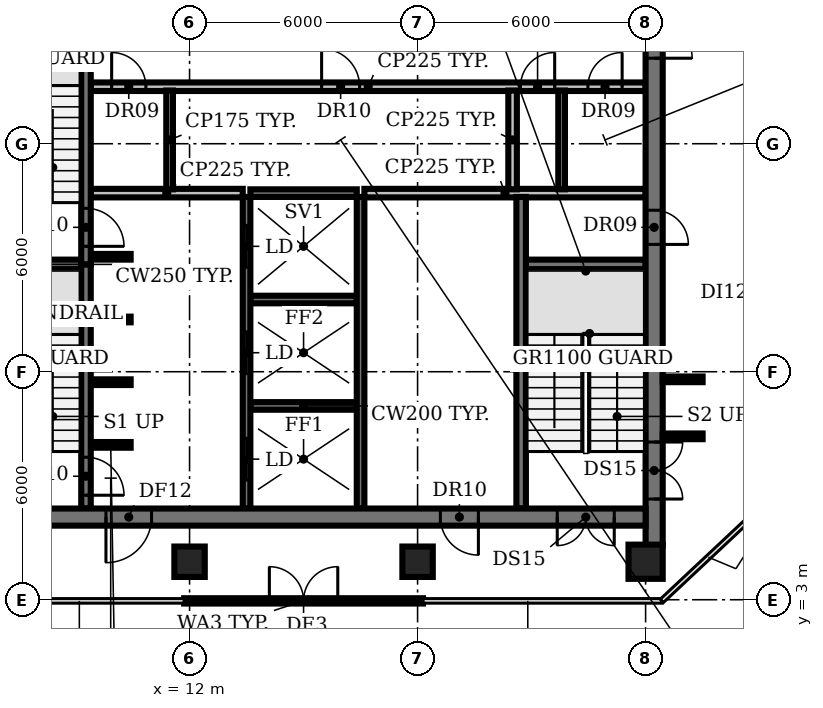
"""IFC4 building model, lengths in metres.
Left out: names, types, materials, properties, quantities, classifications, styles, units other than length and angle.
Written with IfcOpenShell. Run it as: python <this file> out.ifc"""

import sys

from ifc_helpers import new_model, si_unit, direction, frame, frame_2d, origin, origin_2d, place, context, subcontext, project, spatial, rectangle, circle, extrude, element, fill, save


model = new_model("IFC4")
c1 = context("Model", 3, precision=1e-05, world=origin(), true_north=direction((0.0, 1.0)))
c2 = subcontext(c1, "Body", "Model", "MODEL_VIEW")
j1 = project(units=[si_unit("LENGTHUNIT", "METRE"), si_unit("PLANEANGLEUNIT", "RADIAN")], contexts=[c1])
p1 = place(None, origin())
s1 = spatial("IfcSite", under=j1, at=p1, CompositionType="ELEMENT")
p2 = place(p1, origin())
s2 = spatial("IfcBuilding", under=s1, at=p2, CompositionType="ELEMENT")
p3 = place(p2, frame((0.0, 0.0, 213.8)))
s3 = spatial("IfcBuildingStorey", under=s2, at=p3, CompositionType="ELEMENT", Elevation=213.8)
for number, where, z_axis, x_axis in (
    (1, (12.0, 4.0, 0.0), (0.0, 0.0, 1.0), (1.0, 0.0, 0.0)),
    (2, (18.0, 4.0, 0.0), (0.0, 0.0, 1.0), (1.0, 0.0, 0.0)),
):
    element("IfcColumn", number, at=place(p3, frame(where, z_axis=z_axis, x_axis=x_axis)), inside=s3, PredefinedType="COLUMN", context=c2, shape_type="SweptSolid", body=[
        extrude(rectangle(XDim=0.8, YDim=0.8, at=origin_2d()), origin(), (0.0, 0.0, 1.0), 3.85),
    ])
p4 = place(p3, frame((24.0, 4.0, 0.0), z_axis=(0.0, 0.0, 1.0), x_axis=(1.0, 0.0, 0.0)))
e3 = element("IfcColumn", 3, at=p4, inside=s3, PredefinedType="COLUMN", context=c2, shape_type="SweptSolid", body=[
    extrude(circle(Radius=0.45, at=origin_2d()), origin(), (0.0, 0.0, 1.0), 3.85),
])
p5 = place(p3, frame((11.858, 2.97, 0.0), z_axis=(0.0, 0.0, 1.0), x_axis=(1.0, 0.0, 0.0)))
e4 = element("IfcWall", 4, at=p5, inside=s3, PredefinedType="SOLIDWALL", context=c2, shape_type="SweptSolid", body=[
    extrude(rectangle(XDim=6.284, YDim=0.14, at=frame_2d((3.142, 0.0))), origin(), (0.0, 0.0, 1.0), 3.85),
])
p6 = place(p5, frame((2.242, 0.0, 0.0)))
e5 = element("IfcOpeningElement", 5, at=p6, cuts=e4, PredefinedType="OPENING", context=c2, shape_type="SweptSolid", body=[
    extrude(rectangle(XDim=1.8, YDim=2.4, at=frame_2d((0.9, 1.2))), frame((0.0, 0.08, 0.0), z_axis=(0.0, -1.0, 0.0), x_axis=(1.0, 0.0, 0.0)), (0.0, 0.0, 1.0), 0.16),
])
p7 = place(p3, frame((9.4, 7.075, 0.0), z_axis=(0.0, 0.0, 1.0), x_axis=(1.0, 0.0, 0.0)))
e6 = element("IfcWall", 6, at=p7, inside=s3, PredefinedType="SHEAR", context=c2, shape_type="SweptSolid", body=[
    extrude(rectangle(XDim=1.05, YDim=0.15, at=frame_2d((0.525, 0.0))), origin(), (0.0, 0.0, 1.0), 3.85),
])
p8 = place(p3, frame((13.6, 8.1, 0.0), z_axis=(0.0, 0.0, 1.0), x_axis=(1.0, 0.0, 0.0)))
e7 = element("IfcWall", 7, at=p8, inside=s3, PredefinedType="SHEAR", context=c2, shape_type="SweptSolid", body=[
    extrude(rectangle(XDim=2.8, YDim=0.2, at=frame_2d((1.4, 0.0))), origin(), (0.0, 0.0, 1.0), 3.85),
])
for number, where, z_axis, x_axis in (
    (8, (9.4, 8.725, 0.0), (0.0, 0.0, 1.0), (1.0, 0.0, 0.0)),
    (9, (9.4, 10.375, 0.0), (0.0, 0.0, 1.0), (1.0, 0.0, 0.0)),
):
    element("IfcWall", number, at=place(p3, frame(where, z_axis=z_axis, x_axis=x_axis)), inside=s3, PredefinedType="SHEAR", context=c2, shape_type="SweptSolid", body=[
        extrude(rectangle(XDim=1.05, YDim=0.15, at=frame_2d((0.525, 0.0))), origin(), (0.0, 0.0, 1.0), 3.85),
    ])
p9 = place(p3, frame((13.6, 10.9, 0.0), z_axis=(0.0, 0.0, 1.0), x_axis=(1.0, 0.0, 0.0)))
e10 = element("IfcWall", 10, at=p9, inside=s3, PredefinedType="SHEAR", context=c2, shape_type="SweptSolid", body=[
    extrude(rectangle(XDim=2.8, YDim=0.2, at=frame_2d((1.4, 0.0))), origin(), (0.0, 0.0, 1.0), 3.85),
])
for number, where, z_axis, x_axis in (
    (11, (6.0, 11.825, 0.0), (0.0, 0.0, 1.0), (1.0, 0.0, 0.0)),
    (12, (20.85, 11.825, 0.0), (0.0, 0.0, 1.0), (1.0, 0.0, 0.0)),
):
    element("IfcWall", number, at=place(p3, frame(where, z_axis=z_axis, x_axis=x_axis)), inside=s3, PredefinedType="SHEAR", context=c2, shape_type="SweptSolid", body=[
        extrude(rectangle(XDim=3.15, YDim=0.25, at=frame_2d((1.575, 0.0))), origin(), (0.0, 0.0, 1.0), 3.85),
    ])
p10 = place(p3, frame((9.4, 12.025, 0.0), z_axis=(0.0, 0.0, 1.0), x_axis=(1.0, 0.0, 0.0)))
e13 = element("IfcWall", 13, at=p10, inside=s3, PredefinedType="SHEAR", context=c2, shape_type="SweptSolid", body=[
    extrude(rectangle(XDim=1.05, YDim=0.15, at=frame_2d((0.525, 0.0))), origin(), (0.0, 0.0, 1.0), 3.85),
])
p11 = place(p3, frame((9.4, 13.7, 0.0), z_axis=(0.0, 0.0, 1.0), x_axis=(1.0, 0.0, 0.0)))
e14 = element("IfcWall", 14, at=p11, inside=s3, PredefinedType="PARTITIONING", context=c2, shape_type="SweptSolid", body=[
    extrude(rectangle(XDim=4.0, YDim=0.225, at=frame_2d((2.0, 0.0))), origin(), (0.0, 0.0, 1.0), 3.85),
])
p12 = place(p3, frame((13.6, 13.7, 0.0), z_axis=(0.0, 0.0, 1.0), x_axis=(1.0, 0.0, 0.0)))
e15 = element("IfcWall", 15, at=p12, inside=s3, PredefinedType="SHEAR", context=c2, shape_type="SweptSolid", body=[
    extrude(rectangle(XDim=2.8, YDim=0.2, at=frame_2d((1.4, 0.0))), origin(), (0.0, 0.0, 1.0), 3.85),
])
p13 = place(p3, frame((16.6, 13.7, 0.0), z_axis=(0.0, 0.0, 1.0), x_axis=(1.0, 0.0, 0.0)))
e16 = element("IfcWall", 16, at=p13, inside=s3, PredefinedType="PARTITIONING", context=c2, shape_type="SweptSolid", body=[
    extrude(rectangle(XDim=7.4, YDim=0.225, at=frame_2d((3.7, 0.0))), origin(), (0.0, 0.0, 1.0), 3.85),
])
p14 = place(p3, frame((9.4, 16.5, 0.0), z_axis=(0.0, 0.0, 1.0), x_axis=(1.0, 0.0, 0.0)))
e17 = element("IfcWall", 17, at=p14, inside=s3, PredefinedType="PARTITIONING", context=c2, shape_type="SweptSolid", body=[
    extrude(rectangle(XDim=14.6, YDim=0.225, at=frame_2d((7.3, 0.0))), origin(), (0.0, 0.0, 1.0), 3.85),
])
p15 = place(p14, frame((0.55, 0.0, 0.0)))
e18 = element("IfcOpeningElement", 18, at=p15, cuts=e17, PredefinedType="OPENING", context=c2, shape_type="SweptSolid", body=[
    extrude(rectangle(XDim=0.9, YDim=2.1, at=frame_2d((0.45, 1.05))), frame((0.0, 0.123, 0.0), z_axis=(0.0, -1.0, 0.0), x_axis=(1.0, 0.0, 0.0)), (0.0, 0.0, 1.0), 0.245),
])
p16 = place(p14, frame((6.075, 0.0, 0.0)))
e19 = element("IfcOpeningElement", 19, at=p16, cuts=e17, PredefinedType="OPENING", context=c2, shape_type="SweptSolid", body=[
    extrude(rectangle(XDim=1.0, YDim=2.1, at=frame_2d((0.5, 1.05))), frame((0.0, 0.123, 0.0), z_axis=(0.0, -1.0, 0.0), x_axis=(1.0, 0.0, 0.0)), (0.0, 0.0, 1.0), 0.245),
])
p17 = place(p14, frame((11.308, 0.0, 0.0)))
e20 = element("IfcOpeningElement", 20, at=p17, cuts=e17, PredefinedType="OPENING", context=c2, shape_type="SweptSolid", body=[
    extrude(rectangle(XDim=0.9, YDim=2.1, at=frame_2d((0.45, 1.05))), frame((0.0, 0.123, 0.0), z_axis=(0.0, -1.0, 0.0), x_axis=(1.0, 0.0, 0.0)), (0.0, 0.0, 1.0), 0.245),
])
p18 = place(p14, frame((13.083, 0.0, 0.0)))
e21 = element("IfcOpeningElement", 21, at=p18, cuts=e17, PredefinedType="OPENING", context=c2, shape_type="SweptSolid", body=[
    extrude(rectangle(XDim=0.9, YDim=2.1, at=frame_2d((0.45, 1.05))), frame((0.0, 0.123, 0.0), z_axis=(0.0, -1.0, 0.0), x_axis=(1.0, 0.0, 0.0)), (0.0, 0.0, 1.0), 0.245),
])
p19 = place(p3, frame((9.275, 11.825, 0.0), z_axis=(0.0, 0.0, 1.0), x_axis=(0.0, -1.0, 0.0)))
e22 = element("IfcWall", 22, at=p19, inside=s3, PredefinedType="SHEAR", context=c2, shape_type="SweptSolid", body=[
    extrude(rectangle(XDim=6.425, YDim=0.25, at=frame_2d((3.212, 0.0))), origin(), (0.0, 0.0, 1.0), 3.85),
])
p20 = place(p19, frame((5.075, 0.0, 0.0)))
e23 = element("IfcOpeningElement", 23, at=p20, cuts=e22, PredefinedType="OPENING", context=c2, shape_type="SweptSolid", body=[
    extrude(rectangle(XDim=1.0, YDim=2.1, at=frame_2d((0.5, 1.05))), frame((0.0, 0.135, 0.0), z_axis=(0.0, -1.0, 0.0), x_axis=(1.0, 0.0, 0.0)), (0.0, 0.0, 1.0), 0.27),
])
p21 = place(p3, frame((9.275, 18.375, 0.0), z_axis=(0.0, 0.0, 1.0), x_axis=(0.0, -1.0, 0.0)))
e24 = element("IfcWall", 24, at=p21, inside=s3, PredefinedType="SHEAR", context=c2, shape_type="SweptSolid", body=[
    extrude(rectangle(XDim=6.55, YDim=0.25, at=frame_2d((3.275, 0.0))), origin(), (0.0, 0.0, 1.0), 3.85),
])
p22 = place(p21, frame((5.075, 0.0, 0.0)))
e25 = element("IfcOpeningElement", 25, at=p22, cuts=e24, PredefinedType="OPENING", context=c2, shape_type="SweptSolid", body=[
    extrude(rectangle(XDim=1.0, YDim=2.1, at=frame_2d((0.5, 1.05))), frame((0.0, 0.135, 0.0), z_axis=(0.0, -1.0, 0.0), x_axis=(1.0, 0.0, 0.0)), (0.0, 0.0, 1.0), 0.27),
])
p23 = place(p3, frame((11.475, 13.8, 0.0), z_axis=(0.0, 0.0, 1.0), x_axis=(0.0, 1.0, 0.0)))
e26 = element("IfcWall", 26, at=p23, inside=s3, PredefinedType="PARTITIONING", context=c2, shape_type="SweptSolid", body=[
    extrude(rectangle(XDim=2.6, YDim=0.175, at=frame_2d((1.3, 0.0))), origin(), (0.0, 0.0, 1.0), 3.85),
])
p24 = place(p3, frame((13.5, 5.4, 0.0), z_axis=(0.0, 0.0, 1.0), x_axis=(0.0, 1.0, 0.0)))
e27 = element("IfcWall", 27, at=p24, inside=s3, PredefinedType="SHEAR", context=c2, shape_type="SweptSolid", body=[
    extrude(rectangle(XDim=8.2, YDim=0.2, at=frame_2d((4.1, 0.0))), origin(), (0.0, 0.0, 1.0), 3.85),
])
p25 = place(p24, frame((0.75, 0.0, 0.0)))
e28 = element("IfcOpeningElement", 28, at=p25, cuts=e27, PredefinedType="OPENING", context=c2, shape_type="SweptSolid", body=[
    extrude(rectangle(XDim=1.1, YDim=2.1, at=frame_2d((0.55, 1.05))), frame((0.0, 0.11, 0.0), z_axis=(0.0, -1.0, 0.0), x_axis=(1.0, 0.0, 0.0)), (0.0, 0.0, 1.0), 0.22),
])
p26 = place(p24, frame((3.55, 0.0, 0.0)))
e29 = element("IfcOpeningElement", 29, at=p26, cuts=e27, PredefinedType="OPENING", context=c2, shape_type="SweptSolid", body=[
    extrude(rectangle(XDim=1.1, YDim=2.1, at=frame_2d((0.55, 1.05))), frame((0.0, 0.11, 0.0), z_axis=(0.0, -1.0, 0.0), x_axis=(1.0, 0.0, 0.0)), (0.0, 0.0, 1.0), 0.22),
])
p27 = place(p24, frame((6.35, 0.0, 0.0)))
e30 = element("IfcOpeningElement", 30, at=p27, cuts=e27, PredefinedType="OPENING", context=c2, shape_type="SweptSolid", body=[
    extrude(rectangle(XDim=1.1, YDim=2.1, at=frame_2d((0.55, 1.05))), frame((0.0, 0.11, 0.0), z_axis=(0.0, -1.0, 0.0), x_axis=(1.0, 0.0, 0.0)), (0.0, 0.0, 1.0), 0.22),
])
p28 = place(p3, frame((16.5, 5.4, 0.0), z_axis=(0.0, 0.0, 1.0), x_axis=(0.0, 1.0, 0.0)))
e31 = element("IfcWall", 31, at=p28, inside=s3, PredefinedType="SHEAR", context=c2, shape_type="SweptSolid", body=[
    extrude(rectangle(XDim=8.2, YDim=0.2, at=frame_2d((4.1, 0.0))), origin(), (0.0, 0.0, 1.0), 3.85),
])
p29 = place(p3, frame((20.5, 13.8, 0.0), z_axis=(0.0, 0.0, 1.0), x_axis=(0.0, 1.0, 0.0)))
e32 = element("IfcWall", 32, at=p29, inside=s3, PredefinedType="PARTITIONING", context=c2, shape_type="SweptSolid", body=[
    extrude(rectangle(XDim=2.6, YDim=0.225, at=frame_2d((1.3, 0.0))), origin(), (0.0, 0.0, 1.0), 3.85),
])
p30 = place(p3, frame((20.725, 5.4, 0.0), z_axis=(0.0, 0.0, 1.0), x_axis=(0.0, 1.0, 0.0)))
e33 = element("IfcWall", 33, at=p30, inside=s3, PredefinedType="SHEAR", context=c2, shape_type="SweptSolid", body=[
    extrude(rectangle(XDim=8.2, YDim=0.25, at=frame_2d((4.1, 0.0))), origin(), (0.0, 0.0, 1.0), 3.85),
])
p31 = place(p3, frame((21.79, 13.8, 0.0), z_axis=(0.0, 0.0, 1.0), x_axis=(0.0, 1.0, 0.0)))
e34 = element("IfcWall", 34, at=p31, inside=s3, PredefinedType="PARTITIONING", context=c2, shape_type="SweptSolid", body=[
    extrude(rectangle(XDim=2.6, YDim=0.175, at=frame_2d((1.3, 0.0))), origin(), (0.0, 0.0, 1.0), 3.85),
])
p32 = place(p3, frame((24.225, 25.25, 0.0), z_axis=(0.0, 0.0, 1.0), x_axis=(0.0, -1.0, 0.0)))
e35 = element("IfcWall", 35, at=p32, inside=s3, PredefinedType="SHEAR", context=c2, shape_type="SweptSolid", body=[
    extrude(rectangle(XDim=20.83, YDim=0.45, at=frame_2d((10.415, 0.0))), origin(), (0.0, 0.0, 1.0), 3.85),
])
p33 = place(p32, frame((18.1, 0.0, 0.0)))
e36 = element("IfcOpeningElement", 36, at=p33, cuts=e35, PredefinedType="OPENING", context=c2, shape_type="SweptSolid", body=[
    extrude(rectangle(XDim=1.5, YDim=2.1, at=frame_2d((0.75, 1.05))), frame((0.0, 0.235, 0.0), z_axis=(0.0, -1.0, 0.0), x_axis=(1.0, 0.0, 0.0)), (0.0, 0.0, 1.0), 0.47),
])
p34 = place(p32, frame((12.0, 0.0, 0.0)))
e37 = element("IfcOpeningElement", 37, at=p34, cuts=e35, PredefinedType="OPENING", context=c2, shape_type="SweptSolid", body=[
    extrude(rectangle(XDim=0.9, YDim=2.1, at=frame_2d((0.45, 1.05))), frame((0.0, 0.235, 0.0), z_axis=(0.0, -1.0, 0.0), x_axis=(1.0, 0.0, 0.0)), (0.0, 0.0, 1.0), 0.47),
])
p35 = place(p32, frame((6.0, 0.0, 0.0)))
e38 = element("IfcOpeningElement", 38, at=p35, cuts=e35, PredefinedType="OPENING", context=c2, shape_type="SweptSolid", body=[
    extrude(rectangle(XDim=2.0, YDim=2.1, at=frame_2d((1.0, 1.05))), frame((0.0, 0.235, 0.0), z_axis=(0.0, -1.0, 0.0), x_axis=(1.0, 0.0, 0.0)), (0.0, 0.0, 1.0), 0.47),
])
p36 = place(p3, frame((24.0, 5.175, 0.0), z_axis=(0.0, 0.0, 1.0), x_axis=(-1.0, 0.0, 0.0)))
e39 = element("IfcWall", 39, at=p36, inside=s3, PredefinedType="SHEAR", context=c2, shape_type="SweptSolid", body=[
    extrude(rectangle(XDim=18.0, YDim=0.45, at=frame_2d((9.0, 0.0))), origin(), (0.0, 0.0, 1.0), 3.85),
])
p37 = place(p36, frame((0.825, 0.0, 0.0)))
e40 = element("IfcOpeningElement", 40, at=p37, cuts=e39, PredefinedType="OPENING", context=c2, shape_type="SweptSolid", body=[
    extrude(rectangle(XDim=1.5, YDim=2.1, at=frame_2d((0.75, 1.05))), frame((0.0, 0.235, 0.0), z_axis=(0.0, -1.0, 0.0), x_axis=(1.0, 0.0, 0.0)), (0.0, 0.0, 1.0), 0.47),
])
p38 = place(p36, frame((15.675, 0.0, 0.0)))
e41 = element("IfcOpeningElement", 41, at=p38, cuts=e39, PredefinedType="OPENING", context=c2, shape_type="SweptSolid", body=[
    extrude(rectangle(XDim=1.5, YDim=2.1, at=frame_2d((0.75, 1.05))), frame((0.0, 0.235, 0.0), z_axis=(0.0, -1.0, 0.0), x_axis=(1.0, 0.0, 0.0)), (0.0, 0.0, 1.0), 0.47),
])
p39 = place(p36, frame((13.0, 0.0, 0.0)))
e42 = element("IfcOpeningElement", 42, at=p39, cuts=e39, PredefinedType="OPENING", context=c2, shape_type="SweptSolid", body=[
    extrude(rectangle(XDim=1.2, YDim=2.1, at=frame_2d((0.6, 1.05))), frame((0.0, 0.235, 0.0), z_axis=(0.0, -1.0, 0.0), x_axis=(1.0, 0.0, 0.0)), (0.0, 0.0, 1.0), 0.47),
])
p40 = place(p36, frame((4.4, 0.0, 0.0)))
e43 = element("IfcOpeningElement", 43, at=p40, cuts=e39, PredefinedType="OPENING", context=c2, shape_type="SweptSolid", body=[
    extrude(rectangle(XDim=1.0, YDim=2.1, at=frame_2d((0.5, 1.05))), frame((0.0, 0.235, 0.0), z_axis=(0.0, -1.0, 0.0), x_axis=(1.0, 0.0, 0.0)), (0.0, 0.0, 1.0), 0.47),
])
for number, where, z_axis, x_axis in (
    (44, (24.45, 7.3, 0.0), (0.0, 0.0, 1.0), (1.0, 0.0, 0.0)),
    (45, (24.45, 8.8, 0.0), (0.0, 0.0, 1.0), (1.0, 0.0, 0.0)),
):
    element("IfcWall", number, at=place(p3, frame(where, z_axis=z_axis, x_axis=x_axis)), inside=s3, PredefinedType="PARTITIONING", context=c2, shape_type="SweptSolid", body=[
        extrude(rectangle(XDim=1.05, YDim=0.15, at=frame_2d((0.525, 0.0))), origin(), (0.0, 0.0, 1.0), 2.88),
    ])
p41 = place(p6, origin())
e46 = element("IfcDoor", 46, at=p41, inside=s3, OperationType="DOUBLE_DOOR_DOUBLE_SWING", PredefinedType="DOOR", context=c2, shape_type="SweptSolid", body=[
    extrude(rectangle(XDim=1.8, YDim=2.4, at=frame_2d((0.9, 1.2))), frame((0.0, 0.025, 0.0), z_axis=(0.0, -1.0, 0.0), x_axis=(1.0, 0.0, 0.0)), (0.0, 0.0, 1.0), 0.05),
])
fill(e5, e46)
p42 = place(p15, origin())
e47 = element("IfcDoor", 47, at=p42, inside=s3, OperationType="SINGLE_SWING_LEFT", PredefinedType="DOOR", context=c2, shape_type="SweptSolid", body=[
    extrude(rectangle(XDim=0.9, YDim=2.1, at=frame_2d((0.45, 1.05))), frame((0.0, 0.025, 0.0), z_axis=(0.0, -1.0, 0.0), x_axis=(1.0, 0.0, 0.0)), (0.0, 0.0, 1.0), 0.05),
])
fill(e18, e47)
p43 = place(p16, origin())
e48 = element("IfcDoor", 48, at=p43, inside=s3, OperationType="SINGLE_SWING_LEFT", PredefinedType="DOOR", context=c2, shape_type="SweptSolid", body=[
    extrude(rectangle(XDim=1.0, YDim=2.1, at=frame_2d((0.5, 1.05))), frame((0.0, 0.025, 0.0), z_axis=(0.0, -1.0, 0.0), x_axis=(1.0, 0.0, 0.0)), (0.0, 0.0, 1.0), 0.05),
])
fill(e19, e48)
p44 = place(p17, origin())
e49 = element("IfcDoor", 49, at=p44, inside=s3, OperationType="SINGLE_SWING_RIGHT", PredefinedType="DOOR", context=c2, shape_type="SweptSolid", body=[
    extrude(rectangle(XDim=0.9, YDim=2.1, at=frame_2d((0.45, 1.05))), frame((0.0, 0.025, 0.0), z_axis=(0.0, -1.0, 0.0), x_axis=(1.0, 0.0, 0.0)), (0.0, 0.0, 1.0), 0.05),
])
fill(e20, e49)
p45 = place(p18, origin())
e50 = element("IfcDoor", 50, at=p45, inside=s3, OperationType="SINGLE_SWING_RIGHT", PredefinedType="DOOR", context=c2, shape_type="SweptSolid", body=[
    extrude(rectangle(XDim=0.9, YDim=2.1, at=frame_2d((0.45, 1.05))), frame((0.0, 0.025, 0.0), z_axis=(0.0, -1.0, 0.0), x_axis=(1.0, 0.0, 0.0)), (0.0, 0.0, 1.0), 0.05),
])
fill(e21, e50)
p46 = place(p20, origin())
e51 = element("IfcDoor", 51, at=p46, inside=s3, OperationType="SINGLE_SWING_RIGHT", PredefinedType="DOOR", context=c2, shape_type="SweptSolid", body=[
    extrude(rectangle(XDim=1.0, YDim=2.1, at=frame_2d((0.5, 1.05))), frame((0.0, 0.025, 0.0), z_axis=(0.0, -1.0, 0.0), x_axis=(1.0, 0.0, 0.0)), (0.0, 0.0, 1.0), 0.05),
])
fill(e23, e51)
p47 = place(p22, origin())
e52 = element("IfcDoor", 52, at=p47, inside=s3, OperationType="SINGLE_SWING_RIGHT", PredefinedType="DOOR", context=c2, shape_type="SweptSolid", body=[
    extrude(rectangle(XDim=1.0, YDim=2.1, at=frame_2d((0.5, 1.05))), frame((0.0, 0.025, 0.0), z_axis=(0.0, -1.0, 0.0), x_axis=(1.0, 0.0, 0.0)), (0.0, 0.0, 1.0), 0.05),
])
fill(e25, e52)
p48 = place(p25, origin())
e53 = element("IfcDoor", 53, at=p48, inside=s3, OperationType="DOUBLE_DOOR_SLIDING", PredefinedType="DOOR", context=c2, shape_type="SweptSolid", body=[
    extrude(rectangle(XDim=1.1, YDim=2.1, at=frame_2d((0.55, 1.05))), frame((0.0, 0.025, 0.0), z_axis=(0.0, -1.0, 0.0), x_axis=(1.0, 0.0, 0.0)), (0.0, 0.0, 1.0), 0.05),
])
fill(e28, e53)
p49 = place(p26, origin())
e54 = element("IfcDoor", 54, at=p49, inside=s3, OperationType="DOUBLE_DOOR_SLIDING", PredefinedType="DOOR", context=c2, shape_type="SweptSolid", body=[
    extrude(rectangle(XDim=1.1, YDim=2.1, at=frame_2d((0.55, 1.05))), frame((0.0, 0.025, 0.0), z_axis=(0.0, -1.0, 0.0), x_axis=(1.0, 0.0, 0.0)), (0.0, 0.0, 1.0), 0.05),
])
fill(e29, e54)
p50 = place(p27, origin())
e55 = element("IfcDoor", 55, at=p50, inside=s3, OperationType="DOUBLE_DOOR_SLIDING", PredefinedType="DOOR", context=c2, shape_type="SweptSolid", body=[
    extrude(rectangle(XDim=1.1, YDim=2.1, at=frame_2d((0.55, 1.05))), frame((0.0, 0.025, 0.0), z_axis=(0.0, -1.0, 0.0), x_axis=(1.0, 0.0, 0.0)), (0.0, 0.0, 1.0), 0.05),
])
fill(e30, e55)
p51 = place(p33, origin())
e56 = element("IfcDoor", 56, at=p51, inside=s3, OperationType="DOUBLE_DOOR_SINGLE_SWING", PredefinedType="DOOR", context=c2, shape_type="SweptSolid", body=[
    extrude(rectangle(XDim=1.5, YDim=2.1, at=frame_2d((0.75, 1.05))), frame((0.0, 0.025, 0.0), z_axis=(0.0, -1.0, 0.0), x_axis=(1.0, 0.0, 0.0)), (0.0, 0.0, 1.0), 0.05),
])
fill(e36, e56)
p52 = place(p34, origin())
e57 = element("IfcDoor", 57, at=p52, inside=s3, OperationType="SINGLE_SWING_RIGHT", PredefinedType="DOOR", context=c2, shape_type="SweptSolid", body=[
    extrude(rectangle(XDim=0.9, YDim=2.1, at=frame_2d((0.45, 1.05))), frame((0.0, 0.025, 0.0), z_axis=(0.0, -1.0, 0.0), x_axis=(1.0, 0.0, 0.0)), (0.0, 0.0, 1.0), 0.05),
])
fill(e37, e57)
p53 = place(p35, origin())
e58 = element("IfcDoor", 58, at=p53, inside=s3, OperationType="DOUBLE_DOOR_SINGLE_SWING", PredefinedType="DOOR", context=c2, shape_type="SweptSolid", body=[
    extrude(rectangle(XDim=2.0, YDim=2.1, at=frame_2d((1.0, 1.05))), frame((0.0, 0.025, 0.0), z_axis=(0.0, -1.0, 0.0), x_axis=(1.0, 0.0, 0.0)), (0.0, 0.0, 1.0), 0.05),
])
fill(e38, e58)
p54 = place(p37, origin())
e59 = element("IfcDoor", 59, at=p54, inside=s3, OperationType="DOUBLE_DOOR_SINGLE_SWING", PredefinedType="DOOR", context=c2, shape_type="SweptSolid", body=[
    extrude(rectangle(XDim=1.5, YDim=2.1, at=frame_2d((0.75, 1.05))), frame((0.0, 0.025, 0.0), z_axis=(0.0, -1.0, 0.0), x_axis=(1.0, 0.0, 0.0)), (0.0, 0.0, 1.0), 0.05),
])
fill(e40, e59)
p55 = place(p39, origin())
e60 = element("IfcDoor", 60, at=p55, inside=s3, OperationType="SINGLE_SWING_RIGHT", PredefinedType="DOOR", context=c2, shape_type="SweptSolid", body=[
    extrude(rectangle(XDim=1.2, YDim=2.1, at=frame_2d((0.6, 1.05))), frame((0.0, 0.025, 0.0), z_axis=(0.0, -1.0, 0.0), x_axis=(1.0, 0.0, 0.0)), (0.0, 0.0, 1.0), 0.05),
])
fill(e42, e60)
p56 = place(p40, origin())
e61 = element("IfcDoor", 61, at=p56, inside=s3, OperationType="SINGLE_SWING_LEFT", PredefinedType="DOOR", context=c2, shape_type="SweptSolid", body=[
    extrude(rectangle(XDim=1.0, YDim=2.1, at=frame_2d((0.5, 1.05))), frame((0.0, 0.025, 0.0), z_axis=(0.0, -1.0, 0.0), x_axis=(1.0, 0.0, 0.0)), (0.0, 0.0, 1.0), 0.05),
])
fill(e43, e61)
save(model, sys.argv[1])
